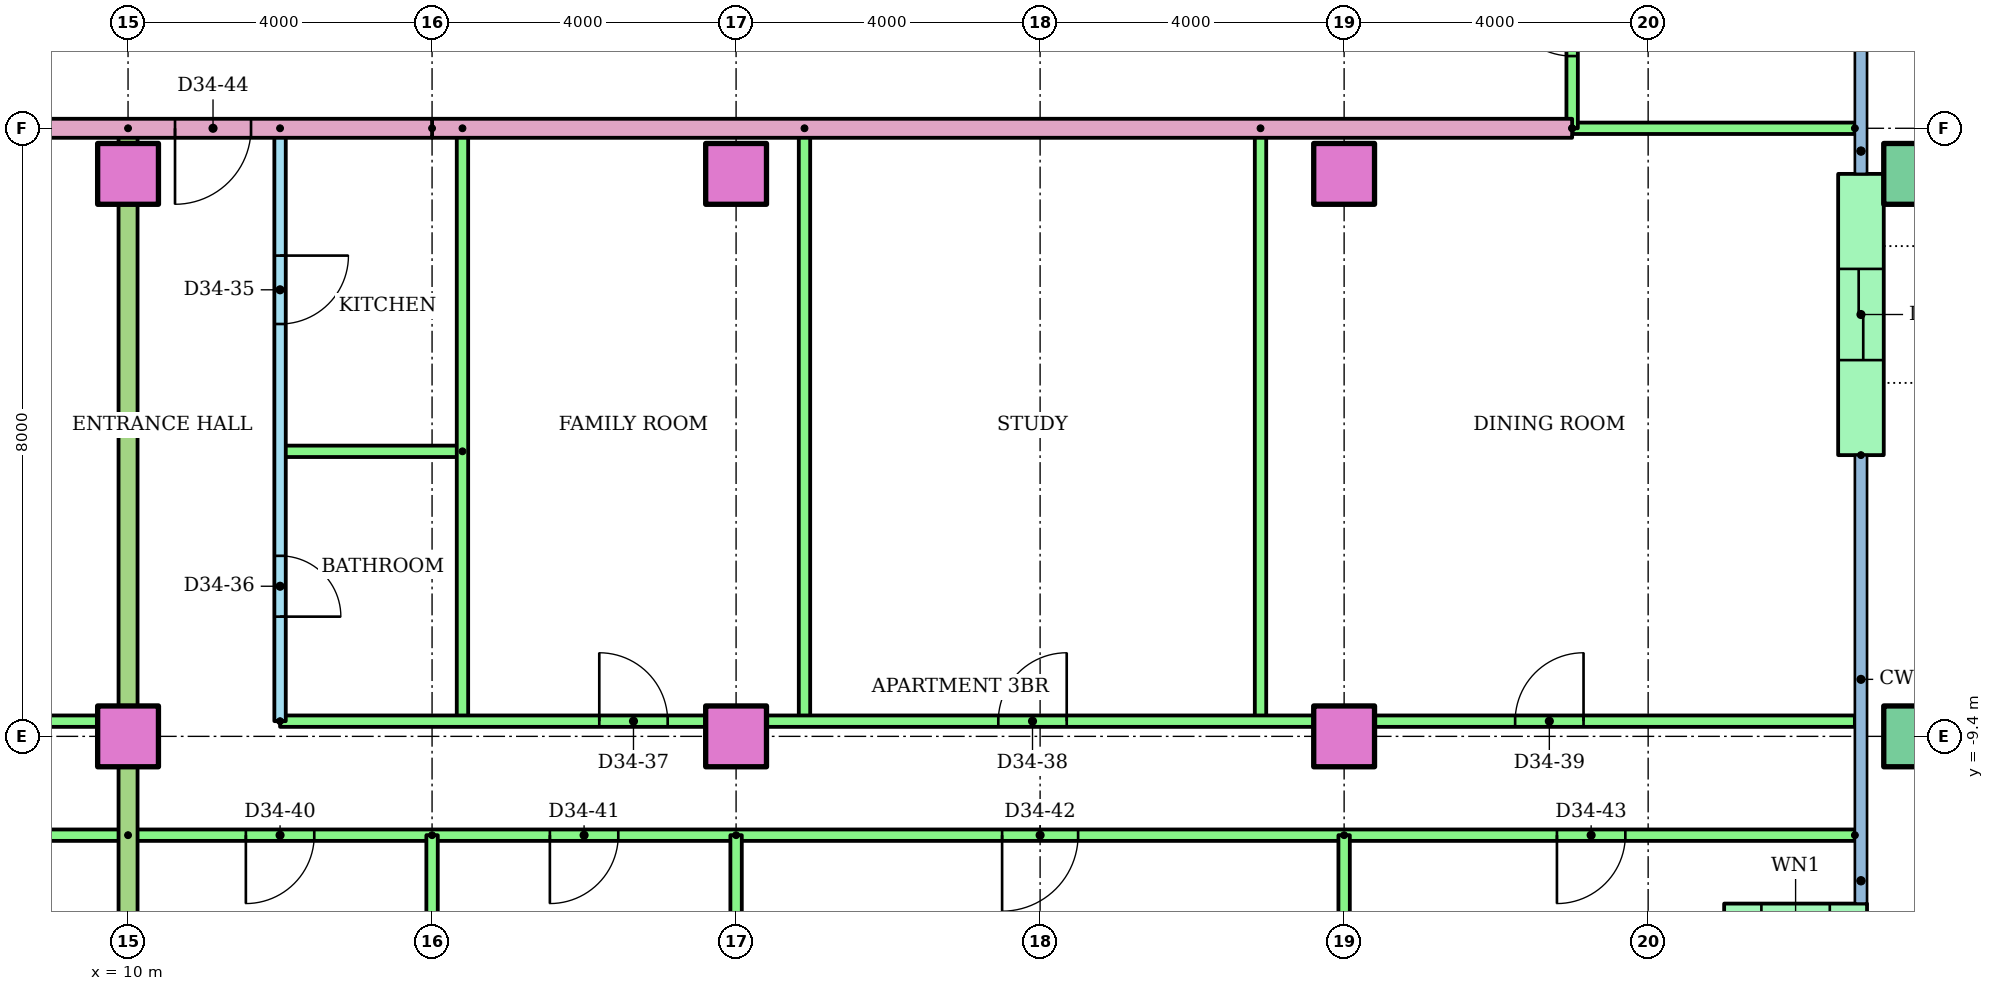
"""IFC4 building model, lengths in metres.
Left out: names, types, materials, properties, quantities, classifications, styles, units other than length and angle.
Written with IfcOpenShell. Run it as: python <this file> out.ifc"""

import sys

from ifc_helpers import new_model, si_unit, direction, frame, frame_2d, origin, origin_2d, place, context, subcontext, project, spatial, rectangle, hollow_rectangle, extrude, element, fill, save


model = new_model("IFC4")
c1 = context("Model", 3, precision=1e-05, world=origin(), true_north=direction((0.0, 1.0)))
c2 = subcontext(c1, "Body", "Model", "MODEL_VIEW")
j1 = project(units=[si_unit("LENGTHUNIT", "METRE"), si_unit("PLANEANGLEUNIT", "RADIAN")], contexts=[c1])
p1 = place(None, origin())
s1 = spatial("IfcSite", under=j1, at=p1, CompositionType="ELEMENT")
p2 = place(p1, origin())
s2 = spatial("IfcBuilding", under=s1, at=p2, CompositionType="ELEMENT")
p3 = place(p2, frame((0.0, 0.0, 132.6)))
s3 = spatial("IfcBuildingStorey", under=s2, at=p3, CompositionType="ELEMENT", Elevation=132.6)
for number, where in (
    (1, (10.0, -9.4, 0.0)),
    (2, (18.0, -9.4, 0.0)),
    (3, (26.0, -9.4, 0.0)),
):
    element("IfcColumn", number, at=place(p3, frame(where)), inside=s3, PredefinedType="COLUMN", context=c2, shape_type="SweptSolid", body=[
        extrude(rectangle(XDim=0.8, YDim=0.8, at=origin_2d()), origin(), (0.0, 0.0, 1.0), 3.2),
    ])
p4 = place(p3, frame((33.5, -9.4, 0.0)))
e4 = element("IfcColumn", 4, at=p4, inside=s3, PredefinedType="COLUMN", context=c2, shape_type="SweptSolid", body=[
    extrude(hollow_rectangle(XDim=0.8, YDim=0.8, WallThickness=0.04, at=origin_2d()), origin(), (0.0, 0.0, 1.0), 3.2),
])
for number, where in (
    (5, (10.0, -2.0, 0.0)),
    (6, (18.0, -2.0, 0.0)),
    (7, (26.0, -2.0, 0.0)),
):
    element("IfcColumn", number, at=place(p3, frame(where)), inside=s3, PredefinedType="COLUMN", context=c2, shape_type="SweptSolid", body=[
        extrude(rectangle(XDim=0.8, YDim=0.8, at=origin_2d()), origin(), (0.0, 0.0, 1.0), 3.2),
    ])
p5 = place(p3, frame((33.5, -2.0, 0.0)))
e8 = element("IfcColumn", 8, at=p5, inside=s3, PredefinedType="COLUMN", context=c2, shape_type="SweptSolid", body=[
    extrude(hollow_rectangle(XDim=0.8, YDim=0.8, WallThickness=0.04, at=origin_2d()), origin(), (0.0, 0.0, 1.0), 3.2),
])
p6 = place(p3, frame((31.0, -11.9, 0.0)))
e9 = element("IfcWall", 9, at=p6, inside=s3, PredefinedType="STANDARD", context=c2, shape_type="SweptSolid", body=[
    extrude(rectangle(XDim=1.88, YDim=0.6, at=frame_2d((0.94, 0.0))), origin(), (0.0, 0.0, 1.0), 2.92),
])
p7 = place(p6, frame((0.49, 0.0, 0.9)))
e10 = element("IfcOpeningElement", 10, at=p7, cuts=e9, PredefinedType="OPENING", context=c2, shape_type="SweptSolid", body=[
    extrude(rectangle(XDim=0.9, YDim=1.5, at=frame_2d((0.45, 0.75))), frame((0.0, 0.31, 0.0), z_axis=(0.0, -1.0, 0.0), x_axis=(1.0, 0.0, 0.0)), (0.0, 0.0, 1.0), 0.62),
])
p8 = place(p3, frame((32.8, -5.7, 0.0), z_axis=(0.0, 0.0, 1.0), x_axis=(0.0, 1.0, 0.0)))
e11 = element("IfcWall", 11, at=p8, inside=s3, PredefinedType="STANDARD", context=c2, shape_type="SweptSolid", body=[
    extrude(rectangle(XDim=3.7, YDim=0.6, at=frame_2d((1.85, 0.0))), origin(), (0.0, 0.0, 1.0), 2.92),
])
p9 = place(p8, frame((1.25, 0.0, 0.0)))
e12 = element("IfcOpeningElement", 12, at=p9, cuts=e11, PredefinedType="OPENING", context=c2, shape_type="SweptSolid", body=[
    extrude(rectangle(XDim=1.2, YDim=2.1, at=frame_2d((0.6, 1.05))), frame((0.0, 0.31, 0.0), z_axis=(0.0, -1.0, 0.0), x_axis=(1.0, 0.0, 0.0)), (0.0, 0.0, 1.0), 0.62),
])
p10 = place(p3, frame((-4.0, -9.2, 0.0)))
e13 = element("IfcWall", 13, at=p10, inside=s3, PredefinedType="PARTITIONING", context=c2, shape_type="SweptSolid", body=[
    extrude(rectangle(XDim=14.0, YDim=0.15, at=frame_2d((7.0, 0.0))), origin(), (0.0, 0.0, 1.0), 2.4),
])
p11 = place(p10, frame((3.45, 0.0, 0.0)))
e14 = element("IfcOpeningElement", 14, at=p11, cuts=e13, PredefinedType="OPENING", context=c2, shape_type="SweptSolid", body=[
    extrude(rectangle(XDim=0.9, YDim=2.1, at=frame_2d((0.45, 1.05))), frame((0.0, 0.085, 0.0), z_axis=(0.0, -1.0, 0.0), x_axis=(1.0, 0.0, 0.0)), (0.0, 0.0, 1.0), 0.17),
])
p12 = place(p10, frame((6.825, 0.0, 0.0)))
e15 = element("IfcOpeningElement", 15, at=p12, cuts=e13, PredefinedType="OPENING", context=c2, shape_type="SweptSolid", body=[
    extrude(rectangle(XDim=0.9, YDim=2.1, at=frame_2d((0.45, 1.05))), frame((0.0, 0.085, 0.0), z_axis=(0.0, -1.0, 0.0), x_axis=(1.0, 0.0, 0.0)), (0.0, 0.0, 1.0), 0.17),
])
p13 = place(p10, frame((11.125, 0.0, 0.0)))
e16 = element("IfcOpeningElement", 16, at=p13, cuts=e13, PredefinedType="OPENING", context=c2, shape_type="SweptSolid", body=[
    extrude(rectangle(XDim=0.9, YDim=2.1, at=frame_2d((0.45, 1.05))), frame((0.0, 0.085, 0.0), z_axis=(0.0, -1.0, 0.0), x_axis=(1.0, 0.0, 0.0)), (0.0, 0.0, 1.0), 0.17),
])
p14 = place(p3, frame((10.0, -10.7, 0.0), z_axis=(0.0, 0.0, 1.0), x_axis=(-1.0, 0.0, 0.0)))
e17 = element("IfcWall", 17, at=p14, inside=s3, PredefinedType="PARTITIONING", context=c2, shape_type="SweptSolid", body=[
    extrude(rectangle(XDim=16.0, YDim=0.15, at=frame_2d((8.0, 0.0))), origin(), (0.0, 0.0, 1.0), 2.4),
])
p15 = place(p14, frame((13.55, 0.0, 0.0)))
e18 = element("IfcOpeningElement", 18, at=p15, cuts=e17, PredefinedType="OPENING", context=c2, shape_type="SweptSolid", body=[
    extrude(rectangle(XDim=0.9, YDim=2.1, at=frame_2d((0.45, 1.05))), frame((0.0, 0.085, 0.0), z_axis=(0.0, -1.0, 0.0), x_axis=(1.0, 0.0, 0.0)), (0.0, 0.0, 1.0), 0.17),
])
p16 = place(p14, frame((9.55, 0.0, 0.0)))
e19 = element("IfcOpeningElement", 19, at=p16, cuts=e17, PredefinedType="OPENING", context=c2, shape_type="SweptSolid", body=[
    extrude(rectangle(XDim=0.9, YDim=2.1, at=frame_2d((0.45, 1.05))), frame((0.0, 0.085, 0.0), z_axis=(0.0, -1.0, 0.0), x_axis=(1.0, 0.0, 0.0)), (0.0, 0.0, 1.0), 0.17),
])
p17 = place(p14, frame((3.5, 0.0, 0.0)))
e20 = element("IfcOpeningElement", 20, at=p17, cuts=e17, PredefinedType="OPENING", context=c2, shape_type="SweptSolid", body=[
    extrude(rectangle(XDim=1.0, YDim=2.1, at=frame_2d((0.5, 1.05))), frame((0.0, 0.085, 0.0), z_axis=(0.0, -1.0, 0.0), x_axis=(1.0, 0.0, 0.0)), (0.0, 0.0, 1.0), 0.17),
])
p18 = place(p3, frame((12.0, -1.4, 0.0), z_axis=(0.0, 0.0, 1.0), x_axis=(0.0, -1.0, 0.0)))
e21 = element("IfcWall", 21, at=p18, inside=s3, PredefinedType="PARTITIONING", context=c2, shape_type="SweptSolid", body=[
    extrude(rectangle(XDim=7.8, YDim=0.15, at=frame_2d((3.9, 0.0))), origin(), (0.0, 0.0, 1.0), 2.4),
])
p19 = place(p18, frame((1.675, 0.0, 0.0)))
e22 = element("IfcOpeningElement", 22, at=p19, cuts=e21, PredefinedType="OPENING", context=c2, shape_type="SweptSolid", body=[
    extrude(rectangle(XDim=0.9, YDim=2.1, at=frame_2d((0.45, 1.05))), frame((0.0, 0.085, 0.0), z_axis=(0.0, -1.0, 0.0), x_axis=(1.0, 0.0, 0.0)), (0.0, 0.0, 1.0), 0.17),
])
p20 = place(p18, frame((5.625, 0.0, 0.0)))
e23 = element("IfcOpeningElement", 23, at=p20, cuts=e21, PredefinedType="OPENING", context=c2, shape_type="SweptSolid", body=[
    extrude(rectangle(XDim=0.8, YDim=2.1, at=frame_2d((0.4, 1.05))), frame((0.0, 0.085, 0.0), z_axis=(0.0, -1.0, 0.0), x_axis=(1.0, 0.0, 0.0)), (0.0, 0.0, 1.0), 0.17),
])
p21 = place(p3, frame((14.4, -5.65, 0.0), z_axis=(0.0, 0.0, 1.0), x_axis=(-1.0, 0.0, 0.0)))
e24 = element("IfcWall", 24, at=p21, inside=s3, PredefinedType="PARTITIONING", context=c2, shape_type="SweptSolid", body=[
    extrude(rectangle(XDim=2.4, YDim=0.15, at=frame_2d((1.2, 0.0))), origin(), (0.0, 0.0, 1.0), 2.4),
])
for number, where, z_axis, x_axis in (
    (25, (14.4, -1.4, 0.0), (0.0, 0.0, 1.0), (0.0, -1.0, 0.0)),
    (26, (18.9, -1.4, 0.0), (0.0, 0.0, 1.0), (0.0, -1.0, 0.0)),
    (27, (24.9, -1.4, 0.0), (0.0, 0.0, 1.0), (0.0, -1.0, 0.0)),
):
    element("IfcWall", number, at=place(p3, frame(where, z_axis=z_axis, x_axis=x_axis)), inside=s3, PredefinedType="PARTITIONING", context=c2, shape_type="SweptSolid", body=[
        extrude(rectangle(XDim=7.8, YDim=0.15, at=frame_2d((3.9, 0.0))), origin(), (0.0, 0.0, 1.0), 2.4),
    ])
p22 = place(p3, frame((12.0, -9.2, 0.0)))
e28 = element("IfcWall", 28, at=p22, inside=s3, PredefinedType="PARTITIONING", context=c2, shape_type="SweptSolid", body=[
    extrude(rectangle(XDim=20.72, YDim=0.15, at=frame_2d((10.36, 0.0))), origin(), (0.0, 0.0, 1.0), 2.4),
])
p23 = place(p22, frame((4.2, 0.0, 0.0)))
e29 = element("IfcOpeningElement", 29, at=p23, cuts=e28, PredefinedType="OPENING", context=c2, shape_type="SweptSolid", body=[
    extrude(rectangle(XDim=0.9, YDim=2.1, at=frame_2d((0.45, 1.05))), frame((0.0, 0.085, 0.0), z_axis=(0.0, -1.0, 0.0), x_axis=(1.0, 0.0, 0.0)), (0.0, 0.0, 1.0), 0.17),
])
p24 = place(p22, frame((9.45, 0.0, 0.0)))
e30 = element("IfcOpeningElement", 30, at=p24, cuts=e28, PredefinedType="OPENING", context=c2, shape_type="SweptSolid", body=[
    extrude(rectangle(XDim=0.9, YDim=2.1, at=frame_2d((0.45, 1.05))), frame((0.0, 0.085, 0.0), z_axis=(0.0, -1.0, 0.0), x_axis=(1.0, 0.0, 0.0)), (0.0, 0.0, 1.0), 0.17),
])
p25 = place(p22, frame((16.25, 0.0, 0.0)))
e31 = element("IfcOpeningElement", 31, at=p25, cuts=e28, PredefinedType="OPENING", context=c2, shape_type="SweptSolid", body=[
    extrude(rectangle(XDim=0.9, YDim=2.1, at=frame_2d((0.45, 1.05))), frame((0.0, 0.085, 0.0), z_axis=(0.0, -1.0, 0.0), x_axis=(1.0, 0.0, 0.0)), (0.0, 0.0, 1.0), 0.17),
])
p26 = place(p3, frame((32.72, -10.7, 0.0), z_axis=(0.0, 0.0, 1.0), x_axis=(-1.0, 0.0, 0.0)))
e32 = element("IfcWall", 32, at=p26, inside=s3, PredefinedType="PARTITIONING", context=c2, shape_type="SweptSolid", body=[
    extrude(rectangle(XDim=22.72, YDim=0.15, at=frame_2d((11.36, 0.0))), origin(), (0.0, 0.0, 1.0), 2.4),
])
p27 = place(p26, frame((20.27, 0.0, 0.0)))
e33 = element("IfcOpeningElement", 33, at=p27, cuts=e32, PredefinedType="OPENING", context=c2, shape_type="SweptSolid", body=[
    extrude(rectangle(XDim=0.9, YDim=2.1, at=frame_2d((0.45, 1.05))), frame((0.0, 0.085, 0.0), z_axis=(0.0, -1.0, 0.0), x_axis=(1.0, 0.0, 0.0)), (0.0, 0.0, 1.0), 0.17),
])
p28 = place(p26, frame((16.27, 0.0, 0.0)))
e34 = element("IfcOpeningElement", 34, at=p28, cuts=e32, PredefinedType="OPENING", context=c2, shape_type="SweptSolid", body=[
    extrude(rectangle(XDim=0.9, YDim=2.1, at=frame_2d((0.45, 1.05))), frame((0.0, 0.085, 0.0), z_axis=(0.0, -1.0, 0.0), x_axis=(1.0, 0.0, 0.0)), (0.0, 0.0, 1.0), 0.17),
])
p29 = place(p26, frame((10.22, 0.0, 0.0)))
e35 = element("IfcOpeningElement", 35, at=p29, cuts=e32, PredefinedType="OPENING", context=c2, shape_type="SweptSolid", body=[
    extrude(rectangle(XDim=1.0, YDim=2.1, at=frame_2d((0.5, 1.05))), frame((0.0, 0.085, 0.0), z_axis=(0.0, -1.0, 0.0), x_axis=(1.0, 0.0, 0.0)), (0.0, 0.0, 1.0), 0.17),
])
p30 = place(p26, frame((3.02, 0.0, 0.0)))
e36 = element("IfcOpeningElement", 36, at=p30, cuts=e32, PredefinedType="OPENING", context=c2, shape_type="SweptSolid", body=[
    extrude(rectangle(XDim=0.9, YDim=2.1, at=frame_2d((0.45, 1.05))), frame((0.0, 0.085, 0.0), z_axis=(0.0, -1.0, 0.0), x_axis=(1.0, 0.0, 0.0)), (0.0, 0.0, 1.0), 0.17),
])
p31 = place(p3, frame((14.0, -10.7, 0.0), z_axis=(0.0, 0.0, 1.0), x_axis=(0.0, -1.0, 0.0)))
e37 = element("IfcWall", 37, at=p31, inside=s3, PredefinedType="PARTITIONING", context=c2, shape_type="SweptSolid", body=[
    extrude(rectangle(XDim=5.621, YDim=0.15, at=frame_2d((2.811, 0.0))), origin(), (0.0, 0.0, 1.0), 2.4),
])
for number, where, z_axis, x_axis in (
    (38, (18.0, -10.7, 0.0), (0.0, 0.0, 1.0), (0.0, -1.0, 0.0)),
    (39, (26.0, -10.7, 0.0), (0.0, 0.0, 1.0), (0.0, -1.0, 0.0)),
):
    element("IfcWall", number, at=place(p3, frame(where, z_axis=z_axis, x_axis=x_axis)), inside=s3, PredefinedType="PARTITIONING", context=c2, shape_type="SweptSolid", body=[
        extrude(rectangle(XDim=5.61, YDim=0.15, at=frame_2d((2.805, 0.0))), origin(), (0.0, 0.0, 1.0), 2.4),
    ])
p32 = place(p3, frame((10.0, -1.4, 0.0), z_axis=(0.0, 0.0, 1.0), x_axis=(0.0, -1.0, 0.0)))
e40 = element("IfcWall", 40, at=p32, inside=s3, PredefinedType="PARTITIONING", context=c2, shape_type="SweptSolid", body=[
    extrude(rectangle(XDim=14.91, YDim=0.25, at=frame_2d((7.455, 0.0))), origin(), (0.0, 0.0, 1.0), 2.4),
])
p33 = place(p3, frame((29.0, -1.4, 0.0), z_axis=(0.0, 0.0, 1.0), x_axis=(-1.0, 0.0, 0.0)))
e41 = element("IfcWall", 41, at=p33, inside=s3, PredefinedType="PARTITIONING", context=c2, shape_type="SweptSolid", body=[
    extrude(rectangle(XDim=15.0, YDim=0.25, at=frame_2d((7.5, 0.0))), origin(), (0.0, 0.0, 1.0), 2.4),
])
p34 = place(p3, frame((32.72, -1.4, 0.0), z_axis=(0.0, 0.0, 1.0), x_axis=(-1.0, 0.0, 0.0)))
e42 = element("IfcWall", 42, at=p34, inside=s3, PredefinedType="PARTITIONING", context=c2, shape_type="SweptSolid", body=[
    extrude(rectangle(XDim=3.72, YDim=0.15, at=frame_2d((1.86, 0.0))), origin(), (0.0, 0.0, 1.0), 2.4),
])
p35 = place(p3, frame((29.0, -1.4, 0.0), z_axis=(0.0, 0.0, 1.0), x_axis=(0.0, 1.0, 0.0)))
e43 = element("IfcWall", 43, at=p35, inside=s3, PredefinedType="PARTITIONING", context=c2, shape_type="SweptSolid", body=[
    extrude(rectangle(XDim=2.8, YDim=0.15, at=frame_2d((1.4, 0.0))), origin(), (0.0, 0.0, 1.0), 2.4),
])
p36 = place(p35, frame((0.95, 0.0, 0.0)))
e44 = element("IfcOpeningElement", 44, at=p36, cuts=e43, PredefinedType="OPENING", context=c2, shape_type="SweptSolid", body=[
    extrude(rectangle(XDim=0.9, YDim=2.1, at=frame_2d((0.45, 1.05))), frame((0.0, 0.085, 0.0), z_axis=(0.0, -1.0, 0.0), x_axis=(1.0, 0.0, 0.0)), (0.0, 0.0, 1.0), 0.17),
])
p37 = place(p3, frame((14.0, -1.4, 0.0), z_axis=(0.0, 0.0, 1.0), x_axis=(-1.0, 0.0, 0.0)))
e45 = element("IfcWall", 45, at=p37, inside=s3, PredefinedType="PARTITIONING", context=c2, shape_type="SweptSolid", body=[
    extrude(rectangle(XDim=28.0, YDim=0.25, at=frame_2d((14.0, 0.0))), origin(), (0.0, 0.0, 1.0), 2.4),
])
p38 = place(p37, frame((20.618, 0.0, 0.0)))
e46 = element("IfcOpeningElement", 46, at=p38, cuts=e45, PredefinedType="OPENING", context=c2, shape_type="SweptSolid", body=[
    extrude(rectangle(XDim=1.0, YDim=2.1, at=frame_2d((0.5, 1.05))), frame((0.0, 0.135, 0.0), z_axis=(0.0, -1.0, 0.0), x_axis=(1.0, 0.0, 0.0)), (0.0, 0.0, 1.0), 0.27),
])
p39 = place(p37, frame((18.382, 0.0, 0.0)))
e47 = element("IfcOpeningElement", 47, at=p39, cuts=e45, PredefinedType="OPENING", context=c2, shape_type="SweptSolid", body=[
    extrude(rectangle(XDim=1.0, YDim=2.1, at=frame_2d((0.5, 1.05))), frame((0.0, 0.135, 0.0), z_axis=(0.0, -1.0, 0.0), x_axis=(1.0, 0.0, 0.0)), (0.0, 0.0, 1.0), 0.27),
])
p40 = place(p37, frame((2.382, 0.0, 0.0)))
e48 = element("IfcOpeningElement", 48, at=p40, cuts=e45, PredefinedType="OPENING", context=c2, shape_type="SweptSolid", body=[
    extrude(rectangle(XDim=1.0, YDim=2.1, at=frame_2d((0.5, 1.05))), frame((0.0, 0.135, 0.0), z_axis=(0.0, -1.0, 0.0), x_axis=(1.0, 0.0, 0.0)), (0.0, 0.0, 1.0), 0.27),
])
p41 = place(p19, origin())
e49 = element("IfcDoor", 49, at=p41, inside=s3, OperationType="SINGLE_SWING_LEFT", PredefinedType="DOOR", context=c2, shape_type="SweptSolid", body=[
    extrude(rectangle(XDim=0.9, YDim=2.1, at=frame_2d((0.45, 1.05))), frame((0.0, 0.025, 0.0), z_axis=(0.0, -1.0, 0.0), x_axis=(1.0, 0.0, 0.0)), (0.0, 0.0, 1.0), 0.05),
])
fill(e22, e49)
p42 = place(p20, origin())
e50 = element("IfcDoor", 50, at=p42, inside=s3, OperationType="SINGLE_SWING_RIGHT", PredefinedType="DOOR", context=c2, shape_type="SweptSolid", body=[
    extrude(rectangle(XDim=0.8, YDim=2.1, at=frame_2d((0.4, 1.05))), frame((0.0, 0.025, 0.0), z_axis=(0.0, -1.0, 0.0), x_axis=(1.0, 0.0, 0.0)), (0.0, 0.0, 1.0), 0.05),
])
fill(e23, e50)
p43 = place(p23, origin())
e51 = element("IfcDoor", 51, at=p43, inside=s3, OperationType="SINGLE_SWING_LEFT", PredefinedType="DOOR", context=c2, shape_type="SweptSolid", body=[
    extrude(rectangle(XDim=0.9, YDim=2.1, at=frame_2d((0.45, 1.05))), frame((0.0, 0.025, 0.0), z_axis=(0.0, -1.0, 0.0), x_axis=(1.0, 0.0, 0.0)), (0.0, 0.0, 1.0), 0.05),
])
fill(e29, e51)
p44 = place(p24, origin())
e52 = element("IfcDoor", 52, at=p44, inside=s3, OperationType="SINGLE_SWING_RIGHT", PredefinedType="DOOR", context=c2, shape_type="SweptSolid", body=[
    extrude(rectangle(XDim=0.9, YDim=2.1, at=frame_2d((0.45, 1.05))), frame((0.0, 0.025, 0.0), z_axis=(0.0, -1.0, 0.0), x_axis=(1.0, 0.0, 0.0)), (0.0, 0.0, 1.0), 0.05),
])
fill(e30, e52)
p45 = place(p25, origin())
e53 = element("IfcDoor", 53, at=p45, inside=s3, OperationType="SINGLE_SWING_RIGHT", PredefinedType="DOOR", context=c2, shape_type="SweptSolid", body=[
    extrude(rectangle(XDim=0.9, YDim=2.1, at=frame_2d((0.45, 1.05))), frame((0.0, 0.025, 0.0), z_axis=(0.0, -1.0, 0.0), x_axis=(1.0, 0.0, 0.0)), (0.0, 0.0, 1.0), 0.05),
])
fill(e31, e53)
p46 = place(p27, origin())
e54 = element("IfcDoor", 54, at=p46, inside=s3, OperationType="SINGLE_SWING_RIGHT", PredefinedType="DOOR", context=c2, shape_type="SweptSolid", body=[
    extrude(rectangle(XDim=0.9, YDim=2.1, at=frame_2d((0.45, 1.05))), frame((0.0, 0.025, 0.0), z_axis=(0.0, -1.0, 0.0), x_axis=(1.0, 0.0, 0.0)), (0.0, 0.0, 1.0), 0.05),
])
fill(e33, e54)
p47 = place(p28, origin())
e55 = element("IfcDoor", 55, at=p47, inside=s3, OperationType="SINGLE_SWING_RIGHT", PredefinedType="DOOR", context=c2, shape_type="SweptSolid", body=[
    extrude(rectangle(XDim=0.9, YDim=2.1, at=frame_2d((0.45, 1.05))), frame((0.0, 0.025, 0.0), z_axis=(0.0, -1.0, 0.0), x_axis=(1.0, 0.0, 0.0)), (0.0, 0.0, 1.0), 0.05),
])
fill(e34, e55)
p48 = place(p29, origin())
e56 = element("IfcDoor", 56, at=p48, inside=s3, OperationType="SINGLE_SWING_RIGHT", PredefinedType="DOOR", context=c2, shape_type="SweptSolid", body=[
    extrude(rectangle(XDim=1.0, YDim=2.1, at=frame_2d((0.5, 1.05))), frame((0.0, 0.025, 0.0), z_axis=(0.0, -1.0, 0.0), x_axis=(1.0, 0.0, 0.0)), (0.0, 0.0, 1.0), 0.05),
])
fill(e35, e56)
p49 = place(p30, origin())
e57 = element("IfcDoor", 57, at=p49, inside=s3, OperationType="SINGLE_SWING_RIGHT", PredefinedType="DOOR", context=c2, shape_type="SweptSolid", body=[
    extrude(rectangle(XDim=0.9, YDim=2.1, at=frame_2d((0.45, 1.05))), frame((0.0, 0.025, 0.0), z_axis=(0.0, -1.0, 0.0), x_axis=(1.0, 0.0, 0.0)), (0.0, 0.0, 1.0), 0.05),
])
fill(e36, e57)
p50 = place(p40, origin())
e58 = element("IfcDoor", 58, at=p50, inside=s3, OperationType="SINGLE_SWING_RIGHT", PredefinedType="DOOR", context=c2, shape_type="SweptSolid", body=[
    extrude(rectangle(XDim=1.0, YDim=2.1, at=frame_2d((0.5, 1.05))), frame((0.0, 0.025, 0.0), z_axis=(0.0, -1.0, 0.0), x_axis=(1.0, 0.0, 0.0)), (0.0, 0.0, 1.0), 0.05),
])
fill(e48, e58)
p51 = place(p36, origin())
e59 = element("IfcDoor", 59, at=p51, inside=s3, OperationType="SINGLE_SWING_RIGHT", PredefinedType="DOOR", context=c2, shape_type="SweptSolid", body=[
    extrude(rectangle(XDim=0.9, YDim=2.1, at=frame_2d((0.45, 1.05))), frame((0.0, 0.025, 0.0), z_axis=(0.0, -1.0, 0.0), x_axis=(1.0, 0.0, 0.0)), (0.0, 0.0, 1.0), 0.05),
])
fill(e44, e59)
p52 = place(p9, origin())
e60 = element("IfcDoor", 60, at=p52, inside=s3, OperationType="SLIDING_TO_LEFT", PredefinedType="DOOR", context=c2, shape_type="SweptSolid", body=[
    extrude(rectangle(XDim=1.2, YDim=2.1, at=frame_2d((0.6, 1.05))), frame((0.0, 0.025, 0.0), z_axis=(0.0, -1.0, 0.0), x_axis=(1.0, 0.0, 0.0)), (0.0, 0.0, 1.0), 0.05),
])
fill(e12, e60)
save(model, sys.argv[1])
